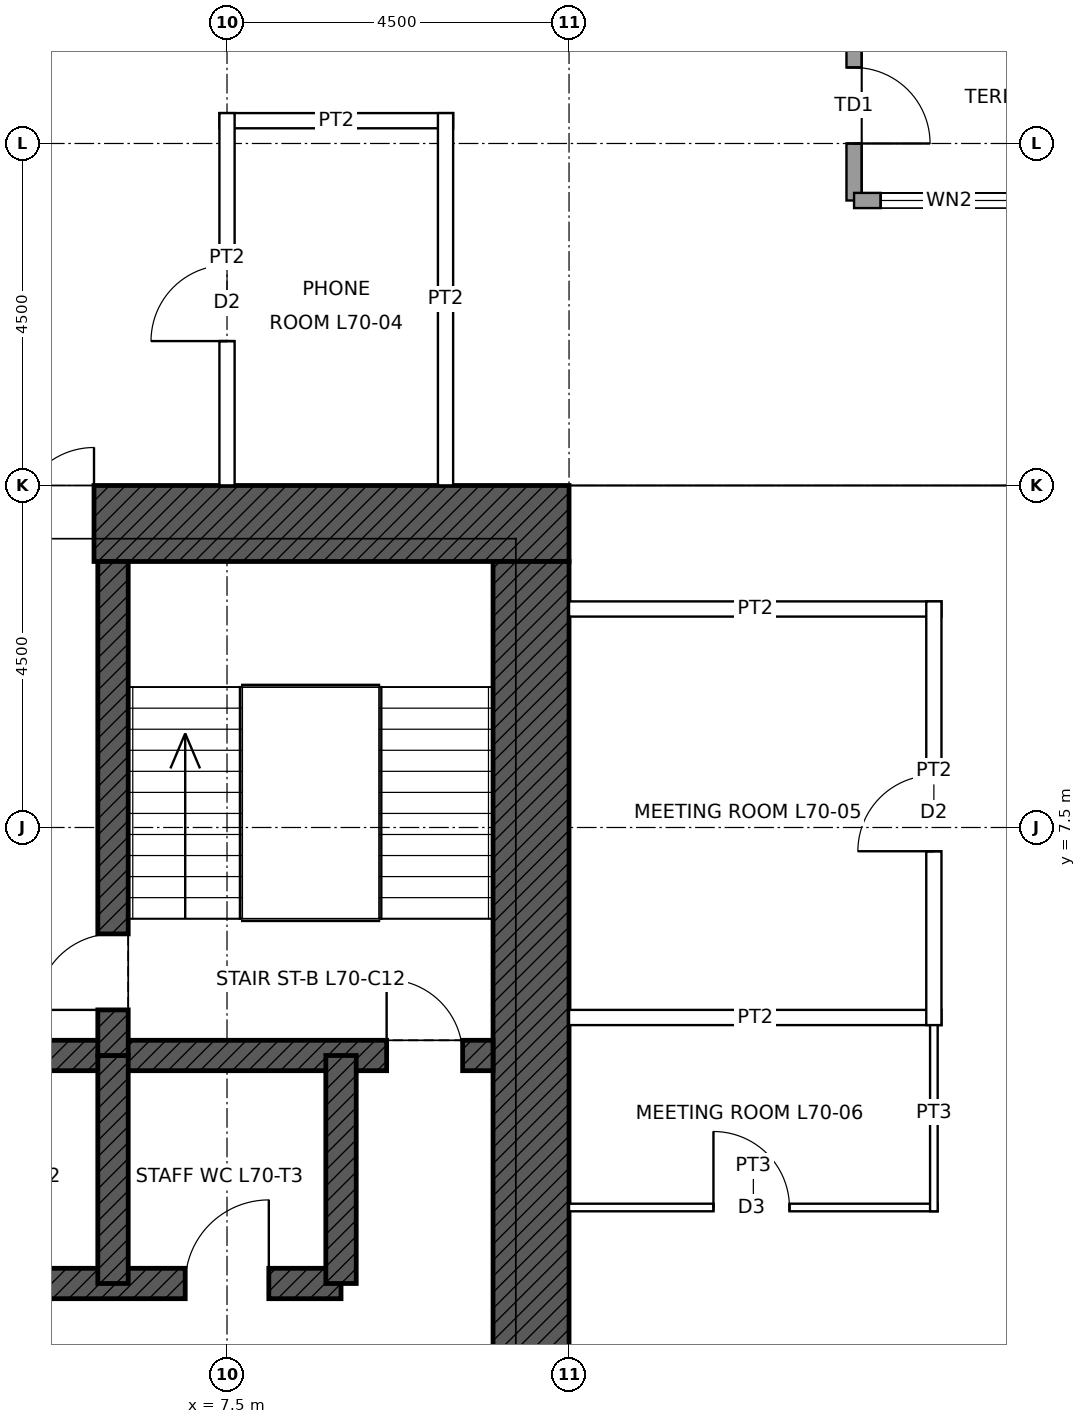
"""IFC4 building model, lengths in metres.
Left out: names, types, materials, properties, quantities, classifications, styles, units other than length and angle.
Written with IfcOpenShell. Run it as: python <this file> out.ifc"""

import sys

from ifc_helpers import new_model, si_unit, direction, frame, frame_2d, origin, place, context, subcontext, project, spatial, rectangle, extrude, element, fill, save


model = new_model("IFC4")
c1 = context("Model", 3, precision=1e-05, world=origin(), true_north=direction((0.0, 1.0)))
c2 = subcontext(c1, "Body", "Model", "MODEL_VIEW")
j1 = project(units=[si_unit("LENGTHUNIT", "METRE"), si_unit("PLANEANGLEUNIT", "RADIAN")], contexts=[c1])
p1 = place(None, origin())
s1 = spatial("IfcSite", under=j1, at=p1, CompositionType="ELEMENT")
p2 = place(p1, origin())
s2 = spatial("IfcBuilding", under=s1, at=p2, CompositionType="ELEMENT")
p3 = place(p2, frame((0.0, 0.0, 315.9)))
s3 = spatial("IfcBuildingStorey", under=s2, at=p3, CompositionType="ELEMENT", Elevation=315.9)
p4 = place(p3, frame((-12.0, 11.5, 0.0), z_axis=(0.0, 0.0, 1.0), x_axis=(1.0, 0.0, 0.0)))
e1 = element("IfcWall", 1, at=p4, inside=s3, PredefinedType="SHEAR", context=c2, shape_type="SweptSolid", body=[
    extrude(rectangle(XDim=24.0, YDim=1.0, at=frame_2d((12.0, 0.0))), origin(), (0.0, 0.0, 1.0), 4.0),
])
p5 = place(p4, frame((6.25, 0.0, 0.0)))
e2 = element("IfcOpeningElement", 2, at=p5, cuts=e1, PredefinedType="OPENING", context=c2, shape_type="SweptSolid", body=[
    extrude(rectangle(XDim=1.0, YDim=2.4, at=frame_2d((0.5, 1.2))), frame((0.0, 0.51, 0.0), z_axis=(0.0, -1.0, 0.0), x_axis=(1.0, 0.0, 0.0)), (0.0, 0.0, 1.0), 1.02),
])
p6 = place(p4, frame((16.75, 0.0, 0.0)))
e3 = element("IfcOpeningElement", 3, at=p6, cuts=e1, PredefinedType="OPENING", context=c2, shape_type="SweptSolid", body=[
    extrude(rectangle(XDim=1.0, YDim=2.4, at=frame_2d((0.5, 1.2))), frame((0.0, 0.51, 0.0), z_axis=(0.0, -1.0, 0.0), x_axis=(1.0, 0.0, 0.0)), (0.0, 0.0, 1.0), 1.02),
])
p7 = place(p3, frame((11.5, 11.0, 0.0), z_axis=(0.0, 0.0, 1.0), x_axis=(0.0, -1.0, 0.0)))
e4 = element("IfcWall", 4, at=p7, inside=s3, PredefinedType="SHEAR", context=c2, shape_type="SweptSolid", body=[
    extrude(rectangle(XDim=22.0, YDim=1.0, at=frame_2d((11.0, 0.0))), origin(), (0.0, 0.0, 1.0), 4.0),
])
p8 = place(p7, frame((10.5, 0.0, 0.0)))
e5 = element("IfcOpeningElement", 5, at=p8, cuts=e4, PredefinedType="OPENING", context=c2, shape_type="SweptSolid", body=[
    extrude(rectangle(XDim=1.0, YDim=2.4, at=frame_2d((0.5, 1.2))), frame((0.0, 0.51, 0.0), z_axis=(0.0, -1.0, 0.0), x_axis=(1.0, 0.0, 0.0)), (0.0, 0.0, 1.0), 1.02),
])
p9 = place(p3, frame((-11.0, 4.5, 0.0), z_axis=(0.0, 0.0, 1.0), x_axis=(1.0, 0.0, 0.0)))
e6 = element("IfcWall", 6, at=p9, inside=s3, PredefinedType="SHEAR", context=c2, shape_type="SweptSolid", body=[
    extrude(rectangle(XDim=22.0, YDim=0.4, at=frame_2d((11.0, 0.0))), origin(), (0.0, 0.0, 1.0), 4.0),
])
p10 = place(p9, frame((0.4, 0.0, 0.0)))
e7 = element("IfcOpeningElement", 7, at=p10, cuts=e6, PredefinedType="OPENING", context=c2, shape_type="SweptSolid", body=[
    extrude(rectangle(XDim=1.0, YDim=2.1, at=frame_2d((0.5, 1.05))), frame((0.0, 0.21, 0.0), z_axis=(0.0, -1.0, 0.0), x_axis=(1.0, 0.0, 0.0)), (0.0, 0.0, 1.0), 0.42),
])
p11 = place(p9, frame((20.6, 0.0, 0.0)))
e8 = element("IfcOpeningElement", 8, at=p11, cuts=e6, PredefinedType="OPENING", context=c2, shape_type="SweptSolid", body=[
    extrude(rectangle(XDim=1.0, YDim=2.1, at=frame_2d((0.5, 1.05))), frame((0.0, 0.21, 0.0), z_axis=(0.0, -1.0, 0.0), x_axis=(1.0, 0.0, 0.0)), (0.0, 0.0, 1.0), 0.42),
])
p12 = place(p3, frame((-9.0, 1.5, 0.0), z_axis=(0.0, 0.0, 1.0), x_axis=(1.0, 0.0, 0.0)))
e9 = element("IfcWall", 9, at=p12, inside=s3, PredefinedType="SHEAR", context=c2, shape_type="SweptSolid", body=[
    extrude(rectangle(XDim=18.0, YDim=0.4, at=frame_2d((9.0, 0.0))), origin(), (0.0, 0.0, 1.0), 4.0),
])
p13 = place(p12, frame((0.95, 0.0, 0.0)))
e10 = element("IfcOpeningElement", 10, at=p13, cuts=e9, PredefinedType="OPENING", context=c2, shape_type="SweptSolid", body=[
    extrude(rectangle(XDim=1.1, YDim=2.1, at=frame_2d((0.55, 1.05))), frame((0.0, 0.21, 0.0), z_axis=(0.0, -1.0, 0.0), x_axis=(1.0, 0.0, 0.0)), (0.0, 0.0, 1.0), 0.42),
])
p14 = place(p12, frame((3.95, 0.0, 0.0)))
e11 = element("IfcOpeningElement", 11, at=p14, cuts=e9, PredefinedType="OPENING", context=c2, shape_type="SweptSolid", body=[
    extrude(rectangle(XDim=1.1, YDim=2.1, at=frame_2d((0.55, 1.05))), frame((0.0, 0.21, 0.0), z_axis=(0.0, -1.0, 0.0), x_axis=(1.0, 0.0, 0.0)), (0.0, 0.0, 1.0), 0.42),
])
p15 = place(p12, frame((6.95, 0.0, 0.0)))
e12 = element("IfcOpeningElement", 12, at=p15, cuts=e9, PredefinedType="OPENING", context=c2, shape_type="SweptSolid", body=[
    extrude(rectangle(XDim=1.1, YDim=2.1, at=frame_2d((0.55, 1.05))), frame((0.0, 0.21, 0.0), z_axis=(0.0, -1.0, 0.0), x_axis=(1.0, 0.0, 0.0)), (0.0, 0.0, 1.0), 0.42),
])
p16 = place(p12, frame((9.95, 0.0, 0.0)))
e13 = element("IfcOpeningElement", 13, at=p16, cuts=e9, PredefinedType="OPENING", context=c2, shape_type="SweptSolid", body=[
    extrude(rectangle(XDim=1.1, YDim=2.1, at=frame_2d((0.55, 1.05))), frame((0.0, 0.21, 0.0), z_axis=(0.0, -1.0, 0.0), x_axis=(1.0, 0.0, 0.0)), (0.0, 0.0, 1.0), 0.42),
])
p17 = place(p12, frame((12.95, 0.0, 0.0)))
e14 = element("IfcOpeningElement", 14, at=p17, cuts=e9, PredefinedType="OPENING", context=c2, shape_type="SweptSolid", body=[
    extrude(rectangle(XDim=1.1, YDim=2.1, at=frame_2d((0.55, 1.05))), frame((0.0, 0.21, 0.0), z_axis=(0.0, -1.0, 0.0), x_axis=(1.0, 0.0, 0.0)), (0.0, 0.0, 1.0), 0.42),
])
p18 = place(p12, frame((15.95, 0.0, 0.0)))
e15 = element("IfcOpeningElement", 15, at=p18, cuts=e9, PredefinedType="OPENING", context=c2, shape_type="SweptSolid", body=[
    extrude(rectangle(XDim=1.1, YDim=2.1, at=frame_2d((0.55, 1.05))), frame((0.0, 0.21, 0.0), z_axis=(0.0, -1.0, 0.0), x_axis=(1.0, 0.0, 0.0)), (0.0, 0.0, 1.0), 0.42),
])
for number, where, z_axis, x_axis in (
    (16, (9.0, 1.5, 0.0), (0.0, 0.0, 1.0), (0.0, 1.0, 0.0)),
    (17, (6.0, 1.5, 0.0), (0.0, 0.0, 1.0), (0.0, 1.0, 0.0)),
):
    element("IfcWall", number, at=place(p3, frame(where, z_axis=z_axis, x_axis=x_axis)), inside=s3, PredefinedType="SHEAR", context=c2, shape_type="SweptSolid", body=[
        extrude(rectangle(XDim=3.0, YDim=0.4, at=frame_2d((1.5, 0.0))), origin(), (0.0, 0.0, 1.0), 4.0),
    ])
p19 = place(p3, frame((6.0, 4.5, 0.0), z_axis=(0.0, 0.0, 1.0), x_axis=(0.0, 1.0, 0.0)))
e18 = element("IfcWall", 18, at=p19, inside=s3, PredefinedType="SHEAR", context=c2, shape_type="SweptSolid", body=[
    extrude(rectangle(XDim=6.5, YDim=0.4, at=frame_2d((3.25, 0.0))), origin(), (0.0, 0.0, 1.0), 4.0),
])
p20 = place(p19, frame((0.6, 0.0, 0.0)))
e19 = element("IfcOpeningElement", 19, at=p20, cuts=e18, PredefinedType="OPENING", context=c2, shape_type="SweptSolid", body=[
    extrude(rectangle(XDim=1.0, YDim=2.1, at=frame_2d((0.5, 1.05))), frame((0.0, 0.21, 0.0), z_axis=(0.0, -1.0, 0.0), x_axis=(1.0, 0.0, 0.0)), (0.0, 0.0, 1.0), 0.42),
])
p21 = place(p3, frame((15.75, 18.25, 0.0), z_axis=(0.0, 0.0, 1.0), x_axis=(0.0, -1.0, 0.0)))
e20 = element("IfcWall", 20, at=p21, inside=s3, PredefinedType="SOLIDWALL", context=c2, shape_type="SweptSolid", body=[
    extrude(rectangle(XDim=2.5, YDim=0.2, at=frame_2d((1.25, 0.0))), origin(), (0.0, 0.0, 1.0), 3.317),
])
p22 = place(p21, frame((0.75, 0.0, 0.0)))
e21 = element("IfcOpeningElement", 21, at=p22, cuts=e20, PredefinedType="OPENING", context=c2, shape_type="SweptSolid", body=[
    extrude(rectangle(XDim=1.0, YDim=2.4, at=frame_2d((0.5, 1.2))), frame((0.0, 0.11, 0.0), z_axis=(0.0, -1.0, 0.0), x_axis=(1.0, 0.0, 0.0)), (0.0, 0.0, 1.0), 0.22),
])
p23 = place(p3, frame((15.75, 15.75, 0.0), z_axis=(0.0, 0.0, 1.0), x_axis=(1.0, 0.0, 0.0)))
e22 = element("IfcWall", 22, at=p23, inside=s3, PredefinedType="SOLIDWALL", context=c2, shape_type="SweptSolid", body=[
    extrude(rectangle(XDim=2.5, YDim=0.2, at=frame_2d((1.25, 0.0))), origin(), (0.0, 0.0, 1.0), 3.85),
])
p24 = place(p23, frame((0.35, 0.0, 0.3)))
e23 = element("IfcOpeningElement", 23, at=p24, cuts=e22, PredefinedType="OPENING", context=c2, shape_type="SweptSolid", body=[
    extrude(rectangle(XDim=1.8, YDim=2.4, at=frame_2d((0.9, 1.2))), frame((0.0, 0.11, 0.0), z_axis=(0.0, -1.0, 0.0), x_axis=(1.0, 0.0, 0.0)), (0.0, 0.0, 1.0), 0.22),
])
p25 = place(p3, frame((12.0, 2.5, 0.0), z_axis=(0.0, 0.0, 1.0), x_axis=(1.0, 0.0, 0.0)))
e24 = element("IfcWall", 24, at=p25, inside=s3, PredefinedType="PARTITIONING", context=c2, shape_type="SweptSolid", body=[
    extrude(rectangle(XDim=4.85, YDim=0.1, at=frame_2d((2.425, 0.0))), origin(), (0.0, 0.0, 1.0), 3.85),
])
p26 = place(p25, frame((1.9, 0.0, 0.0)))
e25 = element("IfcOpeningElement", 25, at=p26, cuts=e24, PredefinedType="OPENING", context=c2, shape_type="SweptSolid", body=[
    extrude(rectangle(XDim=1.0, YDim=2.1, at=frame_2d((0.5, 1.05))), frame((0.0, 0.06, 0.0), z_axis=(0.0, -1.0, 0.0), x_axis=(1.0, 0.0, 0.0)), (0.0, 0.0, 1.0), 0.12),
])
for number, where, z_axis, x_axis in (
    (26, (12.0, 5.0, 0.0), (0.0, 0.0, 1.0), (1.0, 0.0, 0.0)),
    (27, (12.0, 10.375, 0.0), (0.0, 0.0, 1.0), (1.0, 0.0, 0.0)),
):
    element("IfcWall", number, at=place(p3, frame(where, z_axis=z_axis, x_axis=x_axis)), inside=s3, PredefinedType="PARTITIONING", context=c2, shape_type="SweptSolid", body=[
        extrude(rectangle(XDim=4.9, YDim=0.2, at=frame_2d((2.45, 0.0))), origin(), (0.0, 0.0, 1.0), 3.85),
    ])
p27 = place(p3, frame((7.4, 16.8, 0.0), z_axis=(0.0, 0.0, 1.0), x_axis=(1.0, 0.0, 0.0)))
e28 = element("IfcWall", 28, at=p27, inside=s3, PredefinedType="PARTITIONING", context=c2, shape_type="SweptSolid", body=[
    extrude(rectangle(XDim=3.075, YDim=0.2, at=frame_2d((1.538, 0.0))), origin(), (0.0, 0.0, 1.0), 3.85),
])
p28 = place(p3, frame((7.5, 12.0, 0.0), z_axis=(0.0, 0.0, 1.0), x_axis=(0.0, 1.0, 0.0)))
e29 = element("IfcWall", 29, at=p28, inside=s3, PredefinedType="PARTITIONING", context=c2, shape_type="SweptSolid", body=[
    extrude(rectangle(XDim=4.9, YDim=0.2, at=frame_2d((2.45, 0.0))), origin(), (0.0, 0.0, 1.0), 3.243),
])
p29 = place(p28, frame((1.9, 0.0, 0.0)))
e30 = element("IfcOpeningElement", 30, at=p29, cuts=e29, PredefinedType="OPENING", context=c2, shape_type="SweptSolid", body=[
    extrude(rectangle(XDim=1.0, YDim=2.1, at=frame_2d((0.5, 1.05))), frame((0.0, 0.11, 0.0), z_axis=(0.0, -1.0, 0.0), x_axis=(1.0, 0.0, 0.0)), (0.0, 0.0, 1.0), 0.22),
])
p30 = place(p3, frame((10.375, 12.0, 0.0), z_axis=(0.0, 0.0, 1.0), x_axis=(0.0, 1.0, 0.0)))
e31 = element("IfcWall", 31, at=p30, inside=s3, PredefinedType="PARTITIONING", context=c2, shape_type="SweptSolid", body=[
    extrude(rectangle(XDim=4.9, YDim=0.2, at=frame_2d((2.45, 0.0))), origin(), (0.0, 0.0, 1.0), 3.85),
])
p31 = place(p3, frame((16.8, 2.45, 0.0), z_axis=(0.0, 0.0, 1.0), x_axis=(0.0, 1.0, 0.0)))
e32 = element("IfcWall", 32, at=p31, inside=s3, PredefinedType="PARTITIONING", context=c2, shape_type="SweptSolid", body=[
    extrude(rectangle(XDim=2.6, YDim=0.1, at=frame_2d((1.3, 0.0))), origin(), (0.0, 0.0, 1.0), 3.85),
])
p32 = place(p3, frame((16.8, 4.9, 0.0), z_axis=(0.0, 0.0, 1.0), x_axis=(0.0, 1.0, 0.0)))
e33 = element("IfcWall", 33, at=p32, inside=s3, PredefinedType="PARTITIONING", context=c2, shape_type="SweptSolid", body=[
    extrude(rectangle(XDim=5.575, YDim=0.2, at=frame_2d((2.788, 0.0))), origin(), (0.0, 0.0, 1.0), 3.85),
])
p33 = place(p32, frame((2.288, 0.0, 0.0)))
e34 = element("IfcOpeningElement", 34, at=p33, cuts=e33, PredefinedType="OPENING", context=c2, shape_type="SweptSolid", body=[
    extrude(rectangle(XDim=1.0, YDim=2.1, at=frame_2d((0.5, 1.05))), frame((0.0, 0.11, 0.0), z_axis=(0.0, -1.0, 0.0), x_axis=(1.0, 0.0, 0.0)), (0.0, 0.0, 1.0), 0.22),
])
p34 = place(p22, origin())
e35 = element("IfcDoor", 35, at=p34, inside=s3, OperationType="SINGLE_SWING_RIGHT", PredefinedType="DOOR", context=c2, shape_type="SweptSolid", body=[
    extrude(rectangle(XDim=1.0, YDim=2.4, at=frame_2d((0.5, 1.2))), frame((0.0, 0.025, 0.0), z_axis=(0.0, -1.0, 0.0), x_axis=(1.0, 0.0, 0.0)), (0.0, 0.0, 1.0), 0.05),
])
fill(e21, e35)
p35 = place(p24, origin())
e36 = element("IfcWindow", 36, at=p35, inside=s3, PartitioningType="SINGLE_PANEL", PredefinedType="WINDOW", context=c2, shape_type="SweptSolid", body=[
    extrude(rectangle(XDim=1.8, YDim=2.4, at=frame_2d((0.9, 1.2))), frame((0.0, 0.03, 0.0), z_axis=(0.0, -1.0, 0.0), x_axis=(1.0, 0.0, 0.0)), (0.0, 0.0, 1.0), 0.06),
])
fill(e23, e36)
p36 = place(p11, origin())
e37 = element("IfcDoor", 37, at=p36, inside=s3, OperationType="SINGLE_SWING_LEFT", PredefinedType="DOOR", context=c2, shape_type="SweptSolid", body=[
    extrude(rectangle(XDim=1.0, YDim=2.1, at=frame_2d((0.5, 1.05))), frame((0.0, 0.025, 0.0), z_axis=(0.0, -1.0, 0.0), x_axis=(1.0, 0.0, 0.0)), (0.0, 0.0, 1.0), 0.05),
])
fill(e8, e37)
p37 = place(p20, origin())
e38 = element("IfcDoor", 38, at=p37, inside=s3, OperationType="SINGLE_SWING_LEFT", PredefinedType="DOOR", context=c2, shape_type="SweptSolid", body=[
    extrude(rectangle(XDim=1.0, YDim=2.1, at=frame_2d((0.5, 1.05))), frame((0.0, 0.025, 0.0), z_axis=(0.0, -1.0, 0.0), x_axis=(1.0, 0.0, 0.0)), (0.0, 0.0, 1.0), 0.05),
])
fill(e19, e38)
p38 = place(p6, origin())
e39 = element("IfcDoor", 39, at=p38, inside=s3, OperationType="SINGLE_SWING_RIGHT", PredefinedType="DOOR", context=c2, shape_type="SweptSolid", body=[
    extrude(rectangle(XDim=1.0, YDim=2.4, at=frame_2d((0.5, 1.2))), frame((0.0, 0.485, 0.0), z_axis=(0.0, -1.0, 0.0), x_axis=(1.0, 0.0, 0.0)), (0.0, 0.0, 1.0), 0.05),
])
fill(e3, e39)
p39 = place(p18, origin())
e40 = element("IfcDoor", 40, at=p39, inside=s3, OperationType="SINGLE_SWING_RIGHT", PredefinedType="DOOR", context=c2, shape_type="SweptSolid", body=[
    extrude(rectangle(XDim=1.1, YDim=2.1, at=frame_2d((0.55, 1.05))), frame((0.0, 0.025, 0.0), z_axis=(0.0, -1.0, 0.0), x_axis=(1.0, 0.0, 0.0)), (0.0, 0.0, 1.0), 0.05),
])
fill(e15, e40)
p40 = place(p29, origin())
e41 = element("IfcDoor", 41, at=p40, inside=s3, OperationType="SINGLE_SWING_LEFT", PredefinedType="DOOR", context=c2, shape_type="SweptSolid", body=[
    extrude(rectangle(XDim=1.0, YDim=2.1, at=frame_2d((0.5, 1.05))), frame((0.0, 0.025, 0.0), z_axis=(0.0, -1.0, 0.0), x_axis=(1.0, 0.0, 0.0)), (0.0, 0.0, 1.0), 0.05),
])
fill(e30, e41)
p41 = place(p33, origin())
e42 = element("IfcDoor", 42, at=p41, inside=s3, OperationType="SINGLE_SWING_LEFT", PredefinedType="DOOR", context=c2, shape_type="SweptSolid", body=[
    extrude(rectangle(XDim=1.0, YDim=2.1, at=frame_2d((0.5, 1.05))), frame((0.0, 0.025, 0.0), z_axis=(0.0, -1.0, 0.0), x_axis=(1.0, 0.0, 0.0)), (0.0, 0.0, 1.0), 0.05),
])
fill(e34, e42)
p42 = place(p26, origin())
e43 = element("IfcDoor", 43, at=p42, inside=s3, OperationType="SINGLE_SWING_LEFT", PredefinedType="DOOR", context=c2, shape_type="SweptSolid", body=[
    extrude(rectangle(XDim=1.0, YDim=2.1, at=frame_2d((0.5, 1.05))), frame((0.0, 0.025, 0.0), z_axis=(0.0, -1.0, 0.0), x_axis=(1.0, 0.0, 0.0)), (0.0, 0.0, 1.0), 0.05),
])
fill(e25, e43)
save(model, sys.argv[1])
